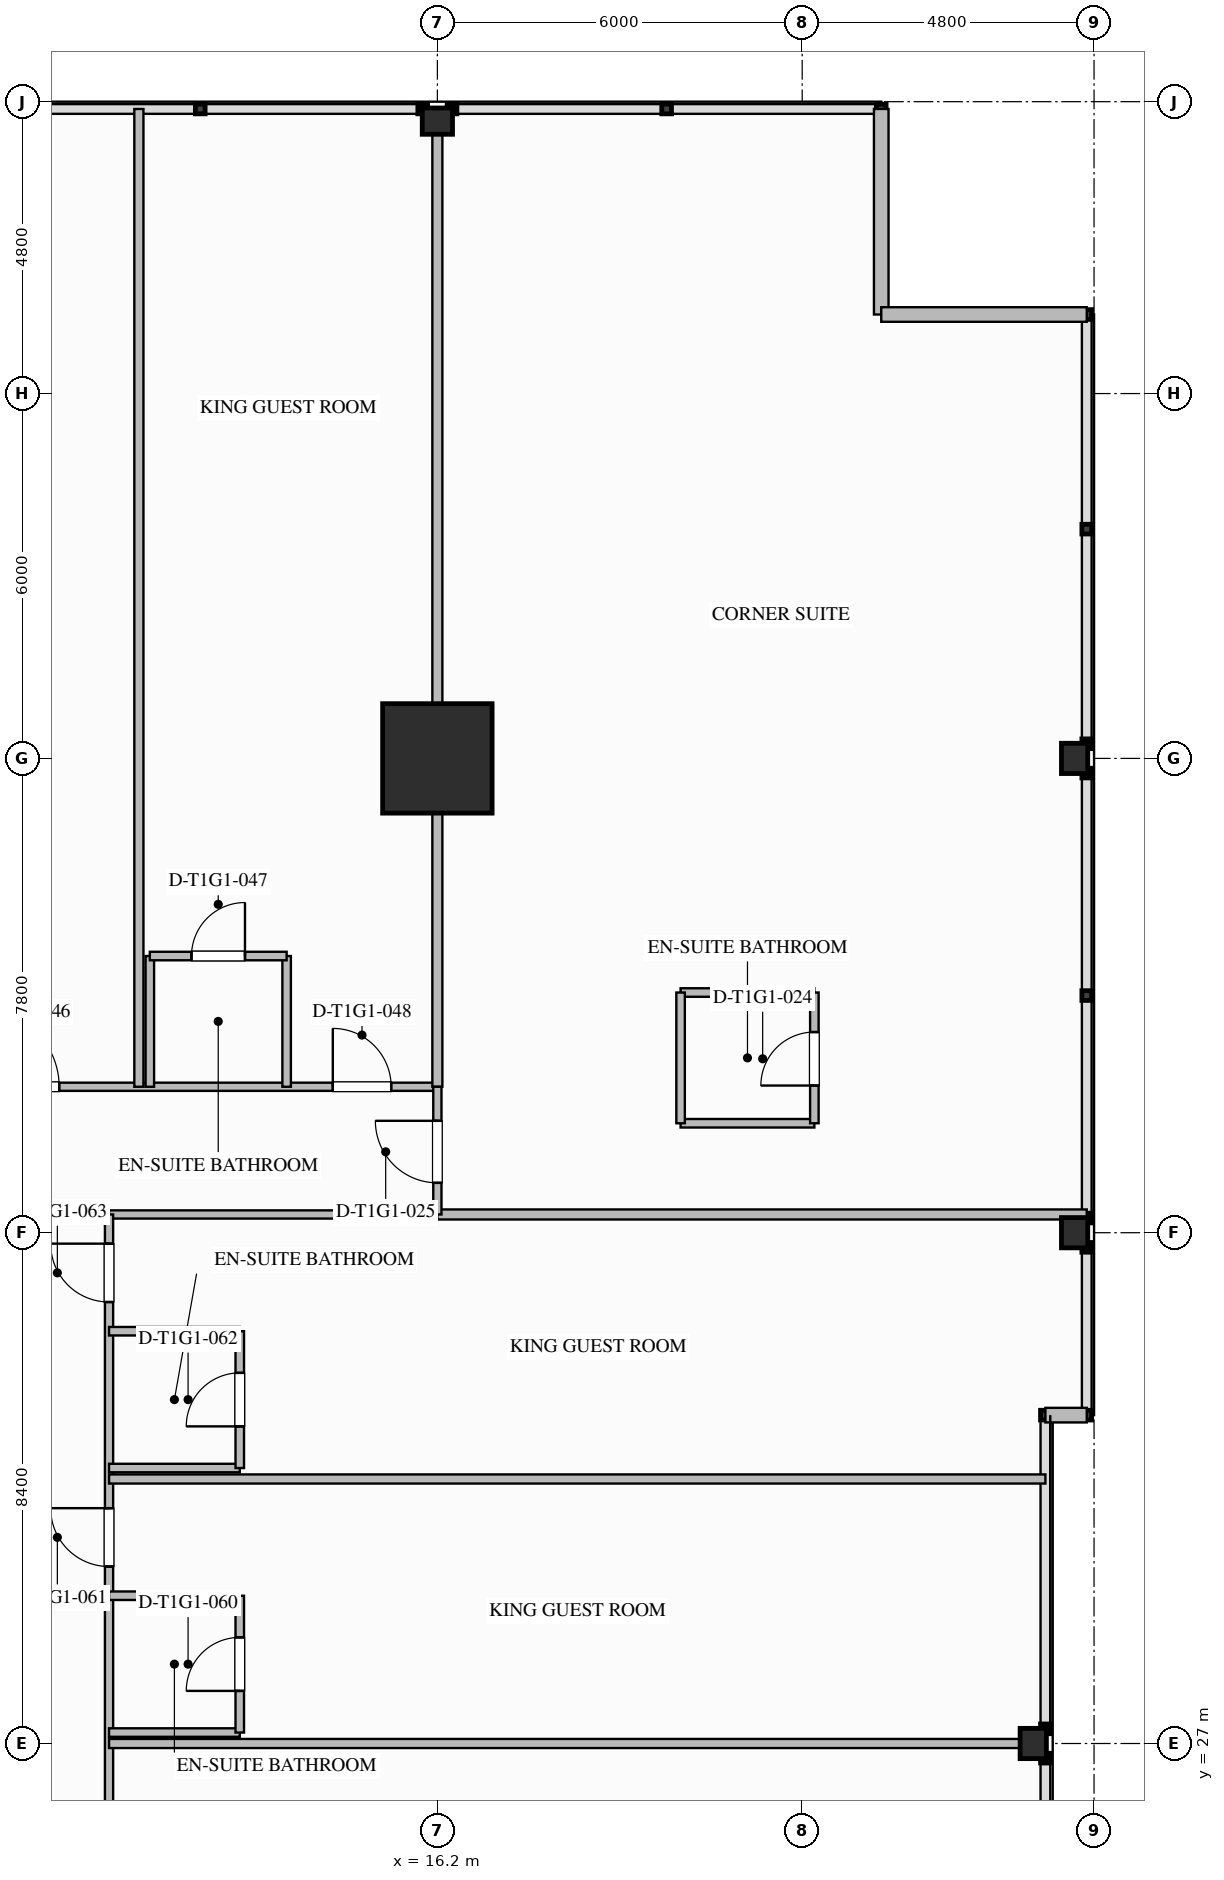
"""IFC4 building model, lengths in metres.
Left out: names, types, materials, properties, quantities, classifications, styles, units other than length and angle.
Written with IfcOpenShell. Run it as: python <this file> out.ifc"""

import sys

from ifc_helpers import new_model, si_unit, direction, frame, frame_2d, origin, origin_2d, place, context, subcontext, project, spatial, rectangle, i_section, extrude, element, fill, save


model = new_model("IFC4")
c1 = context("Model", 3, precision=1e-05, world=origin(), true_north=direction((0.0, 1.0)))
c2 = subcontext(c1, "Body", "Model", "MODEL_VIEW")
j1 = project(units=[si_unit("LENGTHUNIT", "METRE"), si_unit("PLANEANGLEUNIT", "RADIAN")], contexts=[c1])
p1 = place(None, origin())
s1 = spatial("IfcSite", under=j1, at=p1, CompositionType="ELEMENT")
p2 = place(p1, origin())
s2 = spatial("IfcBuilding", under=s1, at=p2, CompositionType="ELEMENT")
p3 = place(p2, frame((0.0, 0.0, 36.7)))
s3 = spatial("IfcBuildingStorey", under=s2, at=p3, CompositionType="ELEMENT", Elevation=36.7)
p4 = place(p3, frame((16.2, 43.2, 0.0), z_axis=(0.0, 0.0, 1.0), x_axis=(1.0, 0.0, 0.0)))
e1 = element("IfcColumn", 1, at=p4, inside=s3, PredefinedType="COLUMN", context=c2, shape_type="SweptSolid", body=[
    extrude(rectangle(XDim=1.8, YDim=1.8, at=origin_2d()), origin(), (0.0, 0.0, 1.0), 3.5),
])
for number, where, z_axis, x_axis in (
    (2, (26.0, 27.0, 0.0), (0.0, 0.0, 1.0), (1.0, 0.0, 0.0)),
    (3, (26.68, 35.4, 0.0), (0.0, 0.0, 1.0), (1.0, 0.0, 0.0)),
    (4, (26.68, 43.2, 0.0), (0.0, 0.0, 1.0), (1.0, 0.0, 0.0)),
    (5, (16.2, 53.68, 0.0), (0.0, 0.0, 1.0), (0.0, 1.0, 0.0)),
):
    element("IfcColumn", number, at=place(p3, frame(where, z_axis=z_axis, x_axis=x_axis)), inside=s3, PredefinedType="COLUMN", context=c2, shape_type="SweptSolid", body=[
        extrude(i_section(OverallWidth=0.432, OverallDepth=0.498, WebThickness=0.056, FlangeThickness=0.089, FilletRadius=0.03, at=origin_2d()), origin(), (0.0, 0.0, 1.0), 3.497),
    ])
for number, where, z_axis, x_axis in (
    (6, (23.5, 53.88, 0.0), (0.0, 0.0, 1.0), (0.0, -1.0, 0.0)),
    (7, (23.5, 50.5, 0.0), (0.0, 0.0, 1.0), (1.0, 0.0, 0.0)),
):
    element("IfcWall", number, at=place(p3, frame(where, z_axis=z_axis, x_axis=x_axis)), inside=s3, PredefinedType="STANDARD", context=c2, shape_type="SweptSolid", body=[
        extrude(rectangle(XDim=3.38, YDim=0.24, at=frame_2d((1.69, 0.0))), origin(), (0.0, 0.0, 1.0), 3.24),
    ])
p5 = place(p3, frame((26.88, 32.4, 0.0), z_axis=(0.0, 0.0, 1.0), x_axis=(-1.0, 0.0, 0.0)))
e8 = element("IfcWall", 8, at=p5, inside=s3, PredefinedType="STANDARD", context=c2, shape_type="SweptSolid", body=[
    extrude(rectangle(XDim=0.68, YDim=0.24, at=frame_2d((0.34, 0.0))), origin(), (0.0, 0.0, 1.0), 3.24),
])
p6 = place(p3, frame((-16.2, 37.8, 0.0), z_axis=(0.0, 0.0, 1.0), x_axis=(1.0, 0.0, 0.0)))
e9 = element("IfcWall", 9, at=p6, inside=s3, PredefinedType="PARTITIONING", context=c2, shape_type="SweptSolid", body=[
    extrude(rectangle(XDim=32.4, YDim=0.135, at=frame_2d((16.2, 0.0))), origin(), (0.0, 0.0, 1.0), 3.24),
])
p7 = place(p6, frame((3.189, 0.0, 0.0)))
e10 = element("IfcOpeningElement", 10, at=p7, cuts=e9, PredefinedType="OPENING", context=c2, shape_type="SweptSolid", body=[
    extrude(rectangle(XDim=0.96, YDim=2.15, at=frame_2d((0.48, 1.075))), frame((0.0, 0.077, 0.0), z_axis=(0.0, -1.0, 0.0), x_axis=(1.0, 0.0, 0.0)), (0.0, 0.0, 1.0), 0.155),
])
p8 = place(p6, frame((8.229, 0.0, 0.0)))
e11 = element("IfcOpeningElement", 11, at=p8, cuts=e9, PredefinedType="OPENING", context=c2, shape_type="SweptSolid", body=[
    extrude(rectangle(XDim=1.26, YDim=2.2, at=frame_2d((0.63, 1.1))), frame((0.0, 0.077, 0.0), z_axis=(0.0, -1.0, 0.0), x_axis=(1.0, 0.0, 0.0)), (0.0, 0.0, 1.0), 0.155),
])
p9 = place(p6, frame((12.78, 0.0, 0.0)))
e12 = element("IfcOpeningElement", 12, at=p9, cuts=e9, PredefinedType="OPENING", context=c2, shape_type="SweptSolid", body=[
    extrude(rectangle(XDim=1.02, YDim=2.15, at=frame_2d((0.51, 1.075))), frame((0.0, 0.077, 0.0), z_axis=(0.0, -1.0, 0.0), x_axis=(1.0, 0.0, 0.0)), (0.0, 0.0, 1.0), 0.155),
])
p10 = place(p6, frame((19.425, 0.0, 0.0)))
e13 = element("IfcOpeningElement", 13, at=p10, cuts=e9, PredefinedType="OPENING", context=c2, shape_type="SweptSolid", body=[
    extrude(rectangle(XDim=0.96, YDim=2.15, at=frame_2d((0.48, 1.075))), frame((0.0, 0.077, 0.0), z_axis=(0.0, -1.0, 0.0), x_axis=(1.0, 0.0, 0.0)), (0.0, 0.0, 1.0), 0.155),
])
p11 = place(p6, frame((24.92, 0.0, 0.0)))
e14 = element("IfcOpeningElement", 14, at=p11, cuts=e9, PredefinedType="OPENING", context=c2, shape_type="SweptSolid", body=[
    extrude(rectangle(XDim=1.26, YDim=2.2, at=frame_2d((0.63, 1.1))), frame((0.0, 0.077, 0.0), z_axis=(0.0, -1.0, 0.0), x_axis=(1.0, 0.0, 0.0)), (0.0, 0.0, 1.0), 0.155),
])
p12 = place(p6, frame((30.68, 0.0, 0.0)))
e15 = element("IfcOpeningElement", 15, at=p12, cuts=e9, PredefinedType="OPENING", context=c2, shape_type="SweptSolid", body=[
    extrude(rectangle(XDim=0.96, YDim=2.15, at=frame_2d((0.48, 1.075))), frame((0.0, 0.077, 0.0), z_axis=(0.0, -1.0, 0.0), x_axis=(1.0, 0.0, 0.0)), (0.0, 0.0, 1.0), 0.155),
])
p13 = place(p3, frame((10.8, 35.7, 0.0), z_axis=(0.0, 0.0, 1.0), x_axis=(1.0, 0.0, 0.0)))
e16 = element("IfcWall", 16, at=p13, inside=s3, PredefinedType="PARTITIONING", context=c2, shape_type="SweptSolid", body=[
    extrude(rectangle(XDim=5.4, YDim=0.135, at=frame_2d((2.7, 0.0))), origin(), (0.0, 0.0, 1.0), 3.24),
])
p14 = place(p3, frame((10.8, 18.3, 0.0), z_axis=(0.0, 0.0, 1.0), x_axis=(0.0, 1.0, 0.0)))
e17 = element("IfcWall", 17, at=p14, inside=s3, PredefinedType="PARTITIONING", context=c2, shape_type="SweptSolid", body=[
    extrude(rectangle(XDim=17.4, YDim=0.135, at=frame_2d((8.7, 0.0))), origin(), (0.0, 0.0, 1.0), 3.24),
])
p15 = place(p14, frame((2.91, 0.0, 0.0)))
e18 = element("IfcOpeningElement", 18, at=p15, cuts=e17, PredefinedType="OPENING", context=c2, shape_type="SweptSolid", body=[
    extrude(rectangle(XDim=0.96, YDim=2.15, at=frame_2d((0.48, 1.075))), frame((0.0, 0.077, 0.0), z_axis=(0.0, -1.0, 0.0), x_axis=(1.0, 0.0, 0.0)), (0.0, 0.0, 1.0), 0.155),
])
p16 = place(p14, frame((6.015, 0.0, 0.0)))
e19 = element("IfcOpeningElement", 19, at=p16, cuts=e17, PredefinedType="OPENING", context=c2, shape_type="SweptSolid", body=[
    extrude(rectangle(XDim=1.02, YDim=2.15, at=frame_2d((0.51, 1.075))), frame((0.0, 0.077, 0.0), z_axis=(0.0, -1.0, 0.0), x_axis=(1.0, 0.0, 0.0)), (0.0, 0.0, 1.0), 0.155),
])
p17 = place(p14, frame((11.61, 0.0, 0.0)))
e20 = element("IfcOpeningElement", 20, at=p17, cuts=e17, PredefinedType="OPENING", context=c2, shape_type="SweptSolid", body=[
    extrude(rectangle(XDim=0.96, YDim=2.15, at=frame_2d((0.48, 1.075))), frame((0.0, 0.077, 0.0), z_axis=(0.0, -1.0, 0.0), x_axis=(1.0, 0.0, 0.0)), (0.0, 0.0, 1.0), 0.155),
])
p18 = place(p14, frame((15.96, 0.0, 0.0)))
e21 = element("IfcOpeningElement", 21, at=p18, cuts=e17, PredefinedType="OPENING", context=c2, shape_type="SweptSolid", body=[
    extrude(rectangle(XDim=0.96, YDim=2.15, at=frame_2d((0.48, 1.075))), frame((0.0, 0.077, 0.0), z_axis=(0.0, -1.0, 0.0), x_axis=(1.0, 0.0, 0.0)), (0.0, 0.0, 1.0), 0.155),
])
p19 = place(p3, frame((16.2, 37.8, 0.0), z_axis=(0.0, 0.0, 1.0), x_axis=(0.0, 1.0, 0.0)))
e22 = element("IfcWall", 22, at=p19, inside=s3, PredefinedType="PARTITIONING", context=c2, shape_type="SweptSolid", body=[
    extrude(rectangle(XDim=16.08, YDim=0.165, at=frame_2d((8.04, 0.0))), origin(), (0.0, 0.0, 1.0), 2.298),
])
p20 = place(p3, frame((16.2, 35.7, 0.0), z_axis=(0.0, 0.0, 1.0), x_axis=(1.0, 0.0, 0.0)))
e23 = element("IfcWall", 23, at=p20, inside=s3, PredefinedType="PARTITIONING", context=c2, shape_type="SweptSolid", body=[
    extrude(rectangle(XDim=10.68, YDim=0.165, at=frame_2d((5.34, 0.0))), origin(), (0.0, 0.0, 1.0), 2.298),
])
p21 = place(p3, frame((16.2, 35.7, 0.0), z_axis=(0.0, 0.0, 1.0), x_axis=(0.0, 1.0, 0.0)))
e24 = element("IfcWall", 24, at=p21, inside=s3, PredefinedType="PARTITIONING", context=c2, shape_type="SweptSolid", body=[
    extrude(rectangle(XDim=2.1, YDim=0.135, at=frame_2d((1.05, 0.0))), origin(), (0.0, 0.0, 1.0), 2.298),
])
p22 = place(p21, frame((0.52, 0.0, 0.0)))
e25 = element("IfcOpeningElement", 25, at=p22, cuts=e24, PredefinedType="OPENING", context=c2, shape_type="SweptSolid", body=[
    extrude(rectangle(XDim=1.02, YDim=2.15, at=frame_2d((0.51, 1.075))), frame((0.0, 0.077, 0.0), z_axis=(0.0, -1.0, 0.0), x_axis=(1.0, 0.0, 0.0)), (0.0, 0.0, 1.0), 0.155),
])
for number, where, z_axis, x_axis in (
    (26, (20.2, 37.2, 0.0), (0.0, 0.0, 1.0), (1.0, 0.0, 0.0)),
    (27, (20.2, 39.35, 0.0), (0.0, 0.0, 1.0), (1.0, 0.0, 0.0)),
):
    element("IfcWall", number, at=place(p3, frame(where, z_axis=z_axis, x_axis=x_axis)), inside=s3, PredefinedType="PLUMBINGWALL", context=c2, shape_type="SweptSolid", body=[
        extrude(rectangle(XDim=2.2, YDim=0.14, at=frame_2d((1.1, 0.0))), origin(), (0.0, 0.0, 1.0), 3.24),
    ])
p23 = place(p3, frame((20.2, 37.2, 0.0), z_axis=(0.0, 0.0, 1.0), x_axis=(0.0, 1.0, 0.0)))
e28 = element("IfcWall", 28, at=p23, inside=s3, PredefinedType="PLUMBINGWALL", context=c2, shape_type="SweptSolid", body=[
    extrude(rectangle(XDim=2.15, YDim=0.14, at=frame_2d((1.075, 0.0))), origin(), (0.0, 0.0, 1.0), 3.24),
])
p24 = place(p3, frame((22.4, 37.2, 0.0), z_axis=(0.0, 0.0, 1.0), x_axis=(0.0, 1.0, 0.0)))
e29 = element("IfcWall", 29, at=p24, inside=s3, PredefinedType="PLUMBINGWALL", context=c2, shape_type="SweptSolid", body=[
    extrude(rectangle(XDim=2.15, YDim=0.14, at=frame_2d((1.075, 0.0))), origin(), (0.0, 0.0, 1.0), 3.24),
])
p25 = place(p24, frame((0.62, 0.0, 0.0)))
e30 = element("IfcOpeningElement", 30, at=p25, cuts=e29, PredefinedType="OPENING", context=c2, shape_type="SweptSolid", body=[
    extrude(rectangle(XDim=0.88, YDim=2.1, at=frame_2d((0.44, 1.05))), frame((0.0, 0.08, 0.0), z_axis=(0.0, -1.0, 0.0), x_axis=(1.0, 0.0, 0.0)), (0.0, 0.0, 1.0), 0.16),
])
p26 = place(p3, frame((11.291, 37.8, 0.0), z_axis=(0.0, 0.0, 1.0), x_axis=(0.0, 1.0, 0.0)))
e31 = element("IfcWall", 31, at=p26, inside=s3, PredefinedType="PARTITIONING", context=c2, shape_type="SweptSolid", body=[
    extrude(rectangle(XDim=16.08, YDim=0.15, at=frame_2d((8.04, 0.0))), origin(), (0.0, 0.0, 1.0), 3.24),
])
for number, where, z_axis, x_axis in (
    (32, (11.471, 37.8, 0.0), (0.0, 0.0, 1.0), (0.0, 1.0, 0.0)),
    (33, (13.721, 37.8, 0.0), (0.0, 0.0, 1.0), (0.0, 1.0, 0.0)),
):
    element("IfcWall", number, at=place(p3, frame(where, z_axis=z_axis, x_axis=x_axis)), inside=s3, PredefinedType="PLUMBINGWALL", context=c2, shape_type="SweptSolid", body=[
        extrude(rectangle(XDim=2.15, YDim=0.14, at=frame_2d((1.075, 0.0))), origin(), (0.0, 0.0, 1.0), 3.24),
    ])
p27 = place(p3, frame((11.471, 39.95, 0.0), z_axis=(0.0, 0.0, 1.0), x_axis=(1.0, 0.0, 0.0)))
e34 = element("IfcWall", 34, at=p27, inside=s3, PredefinedType="PLUMBINGWALL", context=c2, shape_type="SweptSolid", body=[
    extrude(rectangle(XDim=2.25, YDim=0.14, at=frame_2d((1.125, 0.0))), origin(), (0.0, 0.0, 1.0), 3.24),
])
p28 = place(p27, frame((0.685, 0.0, 0.0)))
e35 = element("IfcOpeningElement", 35, at=p28, cuts=e34, PredefinedType="OPENING", context=c2, shape_type="SweptSolid", body=[
    extrude(rectangle(XDim=0.88, YDim=2.1, at=frame_2d((0.44, 1.05))), frame((0.0, 0.08, 0.0), z_axis=(0.0, -1.0, 0.0), x_axis=(1.0, 0.0, 0.0)), (0.0, 0.0, 1.0), 0.16),
])
p29 = place(p3, frame((10.8, 27.0, 0.0), z_axis=(0.0, 0.0, 1.0), x_axis=(1.0, 0.0, 0.0)))
e36 = element("IfcWall", 36, at=p29, inside=s3, PredefinedType="PARTITIONING", context=c2, shape_type="SweptSolid", body=[
    extrude(rectangle(XDim=15.4, YDim=0.15, at=frame_2d((7.7, 0.0))), origin(), (0.0, 0.0, 1.0), 2.298),
])
p30 = place(p3, frame((10.8, 27.18, 0.0), z_axis=(0.0, 0.0, 1.0), x_axis=(1.0, 0.0, 0.0)))
e37 = element("IfcWall", 37, at=p30, inside=s3, PredefinedType="PLUMBINGWALL", context=c2, shape_type="SweptSolid", body=[
    extrude(rectangle(XDim=2.15, YDim=0.14, at=frame_2d((1.075, 0.0))), origin(), (0.0, 0.0, 1.0), 2.617),
])
p31 = place(p3, frame((10.8, 29.43, 0.0), z_axis=(0.0, 0.0, 1.0), x_axis=(1.0, 0.0, 0.0)))
e38 = element("IfcWall", 38, at=p31, inside=s3, PredefinedType="PLUMBINGWALL", context=c2, shape_type="SweptSolid", body=[
    extrude(rectangle(XDim=2.15, YDim=0.14, at=frame_2d((1.075, 0.0))), origin(), (0.0, 0.0, 1.0), 3.24),
])
p32 = place(p3, frame((12.95, 27.18, 0.0), z_axis=(0.0, 0.0, 1.0), x_axis=(0.0, 1.0, 0.0)))
e39 = element("IfcWall", 39, at=p32, inside=s3, PredefinedType="PLUMBINGWALL", context=c2, shape_type="SweptSolid", body=[
    extrude(rectangle(XDim=2.25, YDim=0.14, at=frame_2d((1.125, 0.0))), origin(), (0.0, 0.0, 1.0), 3.24),
])
p33 = place(p32, frame((0.685, 0.0, 0.0)))
e40 = element("IfcOpeningElement", 40, at=p33, cuts=e39, PredefinedType="OPENING", context=c2, shape_type="SweptSolid", body=[
    extrude(rectangle(XDim=0.88, YDim=2.1, at=frame_2d((0.44, 1.05))), frame((0.0, 0.08, 0.0), z_axis=(0.0, -1.0, 0.0), x_axis=(1.0, 0.0, 0.0)), (0.0, 0.0, 1.0), 0.16),
])
p34 = place(p3, frame((10.8, 31.35, 0.0), z_axis=(0.0, 0.0, 1.0), x_axis=(1.0, 0.0, 0.0)))
e41 = element("IfcWall", 41, at=p34, inside=s3, PredefinedType="PARTITIONING", context=c2, shape_type="SweptSolid", body=[
    extrude(rectangle(XDim=15.4, YDim=0.15, at=frame_2d((7.7, 0.0))), origin(), (0.0, 0.0, 1.0), 3.24),
])
for number, where, z_axis, x_axis in (
    (42, (10.8, 31.53, 0.0), (0.0, 0.0, 1.0), (1.0, 0.0, 0.0)),
    (43, (10.8, 33.78, 0.0), (0.0, 0.0, 1.0), (1.0, 0.0, 0.0)),
):
    element("IfcWall", number, at=place(p3, frame(where, z_axis=z_axis, x_axis=x_axis)), inside=s3, PredefinedType="PLUMBINGWALL", context=c2, shape_type="SweptSolid", body=[
        extrude(rectangle(XDim=2.15, YDim=0.14, at=frame_2d((1.075, 0.0))), origin(), (0.0, 0.0, 1.0), 3.24),
    ])
p35 = place(p3, frame((12.95, 31.53, 0.0), z_axis=(0.0, 0.0, 1.0), x_axis=(0.0, 1.0, 0.0)))
e44 = element("IfcWall", 44, at=p35, inside=s3, PredefinedType="PLUMBINGWALL", context=c2, shape_type="SweptSolid", body=[
    extrude(rectangle(XDim=2.25, YDim=0.14, at=frame_2d((1.125, 0.0))), origin(), (0.0, 0.0, 1.0), 3.24),
])
p36 = place(p35, frame((0.685, 0.0, 0.0)))
e45 = element("IfcOpeningElement", 45, at=p36, cuts=e44, PredefinedType="OPENING", context=c2, shape_type="SweptSolid", body=[
    extrude(rectangle(XDim=0.88, YDim=2.1, at=frame_2d((0.44, 1.05))), frame((0.0, 0.08, 0.0), z_axis=(0.0, -1.0, 0.0), x_axis=(1.0, 0.0, 0.0)), (0.0, 0.0, 1.0), 0.16),
])
p37 = place(p25, origin())
e46 = element("IfcDoor", 46, at=p37, inside=s3, OperationType="SINGLE_SWING_LEFT", PredefinedType="DOOR", context=c2, shape_type="SweptSolid", body=[
    extrude(rectangle(XDim=0.88, YDim=2.1, at=frame_2d((0.44, 1.05))), frame((0.0, 0.025, 0.0), z_axis=(0.0, -1.0, 0.0), x_axis=(1.0, 0.0, 0.0)), (0.0, 0.0, 1.0), 0.05),
])
fill(e30, e46)
p38 = place(p22, origin())
e47 = element("IfcDoor", 47, at=p38, inside=s3, OperationType="SINGLE_SWING_RIGHT", PredefinedType="DOOR", context=c2, shape_type="SweptSolid", body=[
    extrude(rectangle(XDim=1.02, YDim=2.15, at=frame_2d((0.51, 1.075))), frame((0.0, 0.025, 0.0), z_axis=(0.0, -1.0, 0.0), x_axis=(1.0, 0.0, 0.0)), (0.0, 0.0, 1.0), 0.05),
])
fill(e25, e47)
p39 = place(p11, origin())
e48 = element("IfcDoor", 48, at=p39, inside=s3, OperationType="SINGLE_SWING_LEFT", PredefinedType="DOOR", context=c2, shape_type="SweptSolid", body=[
    extrude(rectangle(XDim=1.26, YDim=2.2, at=frame_2d((0.63, 1.1))), frame((0.0, 0.025, 0.0), z_axis=(0.0, -1.0, 0.0), x_axis=(1.0, 0.0, 0.0)), (0.0, 0.0, 1.0), 0.05),
])
fill(e14, e48)
p40 = place(p28, origin())
e49 = element("IfcDoor", 49, at=p40, inside=s3, OperationType="SINGLE_SWING_RIGHT", PredefinedType="DOOR", context=c2, shape_type="SweptSolid", body=[
    extrude(rectangle(XDim=0.88, YDim=2.1, at=frame_2d((0.44, 1.05))), frame((0.0, 0.025, 0.0), z_axis=(0.0, -1.0, 0.0), x_axis=(1.0, 0.0, 0.0)), (0.0, 0.0, 1.0), 0.05),
])
fill(e35, e49)
p41 = place(p12, origin())
e50 = element("IfcDoor", 50, at=p41, inside=s3, OperationType="SINGLE_SWING_LEFT", PredefinedType="DOOR", context=c2, shape_type="SweptSolid", body=[
    extrude(rectangle(XDim=0.96, YDim=2.15, at=frame_2d((0.48, 1.075))), frame((0.0, 0.025, 0.0), z_axis=(0.0, -1.0, 0.0), x_axis=(1.0, 0.0, 0.0)), (0.0, 0.0, 1.0), 0.05),
])
fill(e15, e50)
p42 = place(p33, origin())
e51 = element("IfcDoor", 51, at=p42, inside=s3, OperationType="SINGLE_SWING_LEFT", PredefinedType="DOOR", context=c2, shape_type="SweptSolid", body=[
    extrude(rectangle(XDim=0.88, YDim=2.1, at=frame_2d((0.44, 1.05))), frame((0.0, 0.025, 0.0), z_axis=(0.0, -1.0, 0.0), x_axis=(1.0, 0.0, 0.0)), (0.0, 0.0, 1.0), 0.05),
])
fill(e40, e51)
p43 = place(p17, origin())
e52 = element("IfcDoor", 52, at=p43, inside=s3, OperationType="SINGLE_SWING_RIGHT", PredefinedType="DOOR", context=c2, shape_type="SweptSolid", body=[
    extrude(rectangle(XDim=0.96, YDim=2.15, at=frame_2d((0.48, 1.075))), frame((0.0, 0.025, 0.0), z_axis=(0.0, -1.0, 0.0), x_axis=(1.0, 0.0, 0.0)), (0.0, 0.0, 1.0), 0.05),
])
fill(e20, e52)
p44 = place(p36, origin())
e53 = element("IfcDoor", 53, at=p44, inside=s3, OperationType="SINGLE_SWING_LEFT", PredefinedType="DOOR", context=c2, shape_type="SweptSolid", body=[
    extrude(rectangle(XDim=0.88, YDim=2.1, at=frame_2d((0.44, 1.05))), frame((0.0, 0.025, 0.0), z_axis=(0.0, -1.0, 0.0), x_axis=(1.0, 0.0, 0.0)), (0.0, 0.0, 1.0), 0.05),
])
fill(e45, e53)
p45 = place(p18, origin())
e54 = element("IfcDoor", 54, at=p45, inside=s3, OperationType="SINGLE_SWING_RIGHT", PredefinedType="DOOR", context=c2, shape_type="SweptSolid", body=[
    extrude(rectangle(XDim=0.96, YDim=2.15, at=frame_2d((0.48, 1.075))), frame((0.0, 0.025, 0.0), z_axis=(0.0, -1.0, 0.0), x_axis=(1.0, 0.0, 0.0)), (0.0, 0.0, 1.0), 0.05),
])
fill(e21, e54)
save(model, sys.argv[1])
